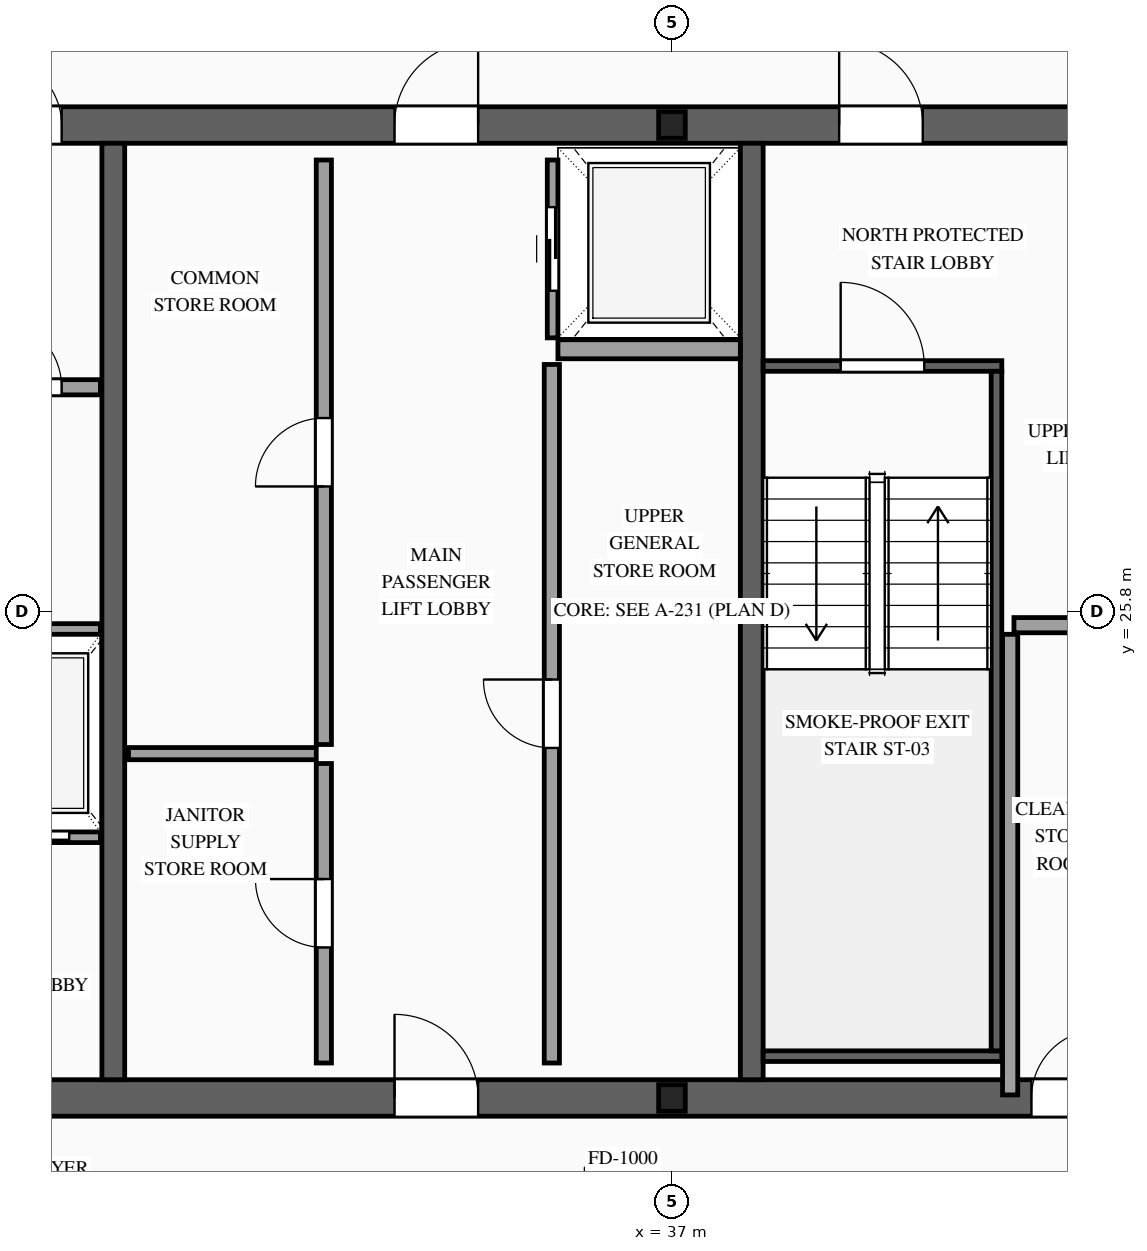
"""IFC4 building model, lengths in metres.
Left out: names, types, materials, properties, quantities, classifications, styles, units other than length and angle.
Written with IfcOpenShell. Run it as: python <this file> out.ifc"""

import sys

from ifc_helpers import new_model, si_unit, direction, frame, frame_2d, origin, origin_2d, place, context, subcontext, project, spatial, rectangle, i_section, extrude, source, transform, mapped, element, fill, save


model = new_model("IFC4")
c1 = context("Model", 3, precision=1e-05, world=origin(), true_north=direction((0.0, 1.0)))
c2 = subcontext(c1, "Body", "Model", "MODEL_VIEW")
j1 = project(units=[si_unit("LENGTHUNIT", "METRE"), si_unit("PLANEANGLEUNIT", "RADIAN")], contexts=[c1])
p1 = place(None, origin())
s1 = spatial("IfcSite", under=j1, at=p1, CompositionType="ELEMENT")
p2 = place(p1, origin())
s2 = spatial("IfcBuilding", under=s1, at=p2, CompositionType="ELEMENT")
p3 = place(p2, frame((0.0, 0.0, 285.6)))
s3 = spatial("IfcBuildingStorey", under=s2, at=p3, CompositionType="ELEMENT", Elevation=285.6)
p4 = place(p3, frame((23.56, 19.4, 0.0), z_axis=(0.0, 0.0, 1.0), x_axis=(1.0, 0.0, 0.0)))
e1 = element("IfcWall", 1, at=p4, inside=s3, PredefinedType="SHEAR", context=c2, shape_type="SweptSolid", body=[
    extrude(rectangle(XDim=26.88, YDim=0.48, at=frame_2d((13.44, 0.0))), origin(), (0.0, 0.0, 1.0), 3.5),
])
p5 = place(p4, frame((1.89, 0.0, 0.0)))
e2 = element("IfcOpeningElement", 2, at=p5, cuts=e1, PredefinedType="OPENING", context=c2, shape_type="SweptSolid", body=[
    extrude(rectangle(XDim=1.1, YDim=2.2, at=frame_2d((0.55, 1.1))), frame((0.0, 0.255, 0.0), z_axis=(0.0, -1.0, 0.0), x_axis=(1.0, 0.0, 0.0)), (0.0, 0.0, 1.0), 0.51),
])
p6 = place(p4, frame((9.79, 0.0, 0.0)))
e3 = element("IfcOpeningElement", 3, at=p6, cuts=e1, PredefinedType="OPENING", context=c2, shape_type="SweptSolid", body=[
    extrude(rectangle(XDim=1.1, YDim=2.2, at=frame_2d((0.55, 1.1))), frame((0.0, 0.255, 0.0), z_axis=(0.0, -1.0, 0.0), x_axis=(1.0, 0.0, 0.0)), (0.0, 0.0, 1.0), 0.51),
])
p7 = place(p4, frame((22.99, 0.0, 0.0)))
e4 = element("IfcOpeningElement", 4, at=p7, cuts=e1, PredefinedType="OPENING", context=c2, shape_type="SweptSolid", body=[
    extrude(rectangle(XDim=1.1, YDim=2.2, at=frame_2d((0.55, 1.1))), frame((0.0, 0.255, 0.0), z_axis=(0.0, -1.0, 0.0), x_axis=(1.0, 0.0, 0.0)), (0.0, 0.0, 1.0), 0.51),
])
p8 = place(p4, frame((19.61, 0.0, 0.0)))
e5 = element("IfcOpeningElement", 5, at=p8, cuts=e1, PredefinedType="OPENING", context=c2, shape_type="SweptSolid", body=[
    extrude(rectangle(XDim=0.9, YDim=2.15, at=frame_2d((0.45, 1.075))), frame((0.0, 0.255, 0.0), z_axis=(0.0, -1.0, 0.0), x_axis=(1.0, 0.0, 0.0)), (0.0, 0.0, 1.0), 0.51),
])
p9 = place(p4, frame((18.17, 0.0, 0.0)))
e6 = element("IfcOpeningElement", 6, at=p9, cuts=e1, PredefinedType="OPENING", context=c2, shape_type="SweptSolid", body=[
    extrude(rectangle(XDim=0.9, YDim=2.15, at=frame_2d((0.45, 1.075))), frame((0.0, 0.255, 0.0), z_axis=(0.0, -1.0, 0.0), x_axis=(1.0, 0.0, 0.0)), (0.0, 0.0, 1.0), 0.51),
])
p10 = place(p3, frame((23.56, 32.2, 0.0), z_axis=(0.0, 0.0, 1.0), x_axis=(1.0, 0.0, 0.0)))
e7 = element("IfcWall", 7, at=p10, inside=s3, PredefinedType="SHEAR", context=c2, shape_type="SweptSolid", body=[
    extrude(rectangle(XDim=26.88, YDim=0.48, at=frame_2d((13.44, 0.0))), origin(), (0.0, 0.0, 1.0), 3.5),
])
p11 = place(p10, frame((4.51, 0.0, 0.0)))
e8 = element("IfcOpeningElement", 8, at=p11, cuts=e7, PredefinedType="OPENING", context=c2, shape_type="SweptSolid", body=[
    extrude(rectangle(XDim=0.9, YDim=2.15, at=frame_2d((0.45, 1.075))), frame((0.0, 0.255, 0.0), z_axis=(0.0, -1.0, 0.0), x_axis=(1.0, 0.0, 0.0)), (0.0, 0.0, 1.0), 0.51),
])
p12 = place(p10, frame((9.79, 0.0, 0.0)))
e9 = element("IfcOpeningElement", 9, at=p12, cuts=e7, PredefinedType="OPENING", context=c2, shape_type="SweptSolid", body=[
    extrude(rectangle(XDim=1.1, YDim=2.2, at=frame_2d((0.55, 1.1))), frame((0.0, 0.255, 0.0), z_axis=(0.0, -1.0, 0.0), x_axis=(1.0, 0.0, 0.0)), (0.0, 0.0, 1.0), 0.51),
])
p13 = place(p10, frame((15.64, 0.0, 0.0)))
e10 = element("IfcOpeningElement", 10, at=p13, cuts=e7, PredefinedType="OPENING", context=c2, shape_type="SweptSolid", body=[
    extrude(rectangle(XDim=1.1, YDim=2.2, at=frame_2d((0.55, 1.1))), frame((0.0, 0.255, 0.0), z_axis=(0.0, -1.0, 0.0), x_axis=(1.0, 0.0, 0.0)), (0.0, 0.0, 1.0), 0.51),
])
p14 = place(p10, frame((18.74, 0.0, 0.0)))
e11 = element("IfcOpeningElement", 11, at=p14, cuts=e7, PredefinedType="OPENING", context=c2, shape_type="SweptSolid", body=[
    extrude(rectangle(XDim=1.1, YDim=2.2, at=frame_2d((0.55, 1.1))), frame((0.0, 0.255, 0.0), z_axis=(0.0, -1.0, 0.0), x_axis=(1.0, 0.0, 0.0)), (0.0, 0.0, 1.0), 0.51),
])
m1 = source(origin(), c2, "Body", "SweptSolid", [
    extrude(rectangle(XDim=12.32, YDim=0.3, at=frame_2d((6.16, 0.0))), origin(), (0.0, 0.0, 1.0), 3.5),
])
for number, where, z_axis, x_axis in (
    (12, (29.65, 19.64, 0.0), (0.0, 0.0, 1.0), (0.0, 1.0, 0.0)),
    (13, (38.05, 19.64, 0.0), (0.0, 0.0, 1.0), (0.0, 1.0, 0.0)),
):
    element("IfcWall", number, at=place(p3, frame(where, z_axis=z_axis, x_axis=x_axis)), inside=s3, PredefinedType="SOLIDWALL", context=c2, shape_type="MappedRepresentation", body=[
        mapped(m1, transform((0.0, 0.0, 0.0), scale=1.0)),
    ])
m2 = source(origin(), c2, "Body", "SweptSolid", [
    extrude(i_section(OverallWidth=0.35, OverallDepth=0.35, WebThickness=0.012, FlangeThickness=0.019, at=origin_2d()), origin(), (0.0, 0.0, 1.0), 3.5),
])
for number, where, z_axis, x_axis in (
    (14, (37.0, 19.4, 0.0), (0.0, 0.0, 1.0), (1.0, 0.0, 0.0)),
    (15, (37.0, 32.2, 0.0), (0.0, 0.0, 1.0), (1.0, 0.0, 0.0)),
):
    element("IfcColumn", number, at=place(p3, frame(where, z_axis=z_axis, x_axis=x_axis)), inside=s3, PredefinedType="COLUMN", context=c2, shape_type="MappedRepresentation", body=[
        mapped(m2, transform((0.0, 0.0, 0.0), scale=1.0)),
    ])
p15 = place(p3, frame((27.56, 22.83, 0.0), z_axis=(0.0, 0.0, 1.0), x_axis=(1.0, 0.0, 0.0)))
e16 = element("IfcWall", 16, at=p15, inside=s3, PredefinedType="SOLIDWALL", context=c2, shape_type="SweptSolid", body=[
    extrude(rectangle(XDim=1.92, YDim=0.14, at=frame_2d((0.96, 0.0))), origin(), (0.0, 0.0, 1.0), 3.28),
])
p16 = place(p15, frame((0.41, 0.0, 0.0)))
e17 = element("IfcOpeningElement", 17, at=p16, cuts=e16, PredefinedType="OPENING", context=c2, shape_type="SweptSolid", body=[
    extrude(rectangle(XDim=1.1, YDim=2.2, at=frame_2d((0.55, 1.1))), frame((0.0, 0.085, 0.0), z_axis=(0.0, -1.0, 0.0), x_axis=(1.0, 0.0, 0.0)), (0.0, 0.0, 1.0), 0.17),
])
m3 = source(origin(), c2, "Body", "SweptSolid", [
    extrude(rectangle(XDim=1.92, YDim=0.14, at=frame_2d((0.96, 0.0))), origin(), (0.0, 0.0, 1.0), 3.28),
])
p17 = place(p3, frame((27.56, 25.57, 0.0), z_axis=(0.0, 0.0, 1.0), x_axis=(1.0, 0.0, 0.0)))
e18 = element("IfcWall", 18, at=p17, inside=s3, PredefinedType="SOLIDWALL", context=c2, shape_type="MappedRepresentation", body=[
    mapped(m3, transform((0.0, 0.0, 0.0), scale=1.0)),
])
p18 = place(p3, frame((35.43, 29.4, 0.0), z_axis=(0.0, 0.0, 1.0), x_axis=(0.0, 1.0, 0.0)))
e19 = element("IfcWall", 19, at=p18, inside=s3, PredefinedType="SOLIDWALL", context=c2, shape_type="SweptSolid", body=[
    extrude(rectangle(XDim=2.34, YDim=0.14, at=frame_2d((1.17, 0.0))), origin(), (0.0, 0.0, 1.0), 3.28),
])
p19 = place(p18, frame((0.62, 0.0, 0.0)))
e20 = element("IfcOpeningElement", 20, at=p19, cuts=e19, PredefinedType="OPENING", context=c2, shape_type="SweptSolid", body=[
    extrude(rectangle(XDim=1.1, YDim=2.2, at=frame_2d((0.55, 1.1))), frame((0.0, 0.085, 0.0), z_axis=(0.0, -1.0, 0.0), x_axis=(1.0, 0.0, 0.0)), (0.0, 0.0, 1.0), 0.17),
])
m4 = source(origin(), c2, "Body", "SweptSolid", [
    extrude(rectangle(XDim=2.4, YDim=0.25, at=frame_2d((1.2, 0.0))), origin(), (0.0, 0.0, 1.0), 3.28),
])
p20 = place(p3, frame((35.5, 29.25, 0.0), z_axis=(0.0, 0.0, 1.0), x_axis=(1.0, 0.0, 0.0)))
e21 = element("IfcWall", 21, at=p20, inside=s3, PredefinedType="SOLIDWALL", context=c2, shape_type="MappedRepresentation", body=[
    mapped(m4, transform((0.0, 0.0, 0.0), scale=1.0)),
])
p21 = place(p3, frame((38.2, 29.03, 0.0), z_axis=(0.0, 0.0, 1.0), x_axis=(1.0, 0.0, 0.0)))
e22 = element("IfcWall", 22, at=p21, inside=s3, PredefinedType="SOLIDWALL", context=c2, shape_type="SweptSolid", body=[
    extrude(rectangle(XDim=3.14, YDim=0.14, at=frame_2d((1.57, 0.0))), origin(), (0.0, 0.0, 1.0), 3.28),
])
p22 = place(p21, frame((1.02, 0.0, 0.0)))
e23 = element("IfcOpeningElement", 23, at=p22, cuts=e22, PredefinedType="OPENING", context=c2, shape_type="SweptSolid", body=[
    extrude(rectangle(XDim=1.1, YDim=2.2, at=frame_2d((0.55, 1.1))), frame((0.0, 0.085, 0.0), z_axis=(0.0, -1.0, 0.0), x_axis=(1.0, 0.0, 0.0)), (0.0, 0.0, 1.0), 0.17),
])
m5 = source(origin(), c2, "Body", "SweptSolid", [
    extrude(rectangle(XDim=3.14, YDim=0.14, at=frame_2d((1.57, 0.0))), origin(), (0.0, 0.0, 1.0), 3.28),
])
p23 = place(p3, frame((38.2, 19.95, 0.0), z_axis=(0.0, 0.0, 1.0), x_axis=(1.0, 0.0, 0.0)))
e24 = element("IfcWall", 24, at=p23, inside=s3, PredefinedType="SOLIDWALL", context=c2, shape_type="MappedRepresentation", body=[
    mapped(m5, transform((0.0, 0.0, 0.0), scale=1.0)),
])
m6 = source(origin(), c2, "Body", "SweptSolid", [
    extrude(rectangle(XDim=8.94, YDim=0.14, at=frame_2d((4.47, 0.0))), origin(), (0.0, 0.0, 1.0), 3.28),
])
p24 = place(p3, frame((41.27, 20.02, 0.0), z_axis=(0.0, 0.0, 1.0), x_axis=(0.0, 1.0, 0.0)))
e25 = element("IfcWall", 25, at=p24, inside=s3, PredefinedType="SOLIDWALL", context=c2, shape_type="MappedRepresentation", body=[
    mapped(m6, transform((0.0, 0.0, 0.0), scale=1.0)),
])
p25 = place(p3, frame((27.56, 28.75, 0.0), z_axis=(0.0, 0.0, 1.0), x_axis=(1.0, 0.0, 0.0)))
e26 = element("IfcWall", 26, at=p25, inside=s3, PredefinedType="PARTITIONING", context=c2, shape_type="SweptSolid", body=[
    extrude(rectangle(XDim=1.92, YDim=0.2, at=frame_2d((0.96, 0.0))), origin(), (0.0, 0.0, 1.0), 3.28),
])
p26 = place(p25, frame((0.51, 0.0, 0.0)))
e27 = element("IfcOpeningElement", 27, at=p26, cuts=e26, PredefinedType="OPENING", context=c2, shape_type="SweptSolid", body=[
    extrude(rectangle(XDim=0.9, YDim=2.15, at=frame_2d((0.45, 1.075))), frame((0.0, 0.115, 0.0), z_axis=(0.0, -1.0, 0.0), x_axis=(1.0, 0.0, 0.0)), (0.0, 0.0, 1.0), 0.23),
])
p27 = place(p3, frame((32.42, 19.86, 0.0), z_axis=(0.0, 0.0, 1.0), x_axis=(0.0, 1.0, 0.0)))
e28 = element("IfcWall", 28, at=p27, inside=s3, PredefinedType="PARTITIONING", context=c2, shape_type="SweptSolid", body=[
    extrude(rectangle(XDim=3.94, YDim=0.2, at=frame_2d((1.97, 0.0))), origin(), (0.0, 0.0, 1.0), 3.28),
])
p28 = place(p27, frame((1.52, 0.0, 0.0)))
e29 = element("IfcOpeningElement", 29, at=p28, cuts=e28, PredefinedType="OPENING", context=c2, shape_type="SweptSolid", body=[
    extrude(rectangle(XDim=0.9, YDim=2.15, at=frame_2d((0.45, 1.075))), frame((0.0, 0.115, 0.0), z_axis=(0.0, -1.0, 0.0), x_axis=(1.0, 0.0, 0.0)), (0.0, 0.0, 1.0), 0.23),
])
p29 = place(p3, frame((32.42, 24.05, 0.0), z_axis=(0.0, 0.0, 1.0), x_axis=(0.0, 1.0, 0.0)))
e30 = element("IfcWall", 30, at=p29, inside=s3, PredefinedType="PARTITIONING", context=c2, shape_type="SweptSolid", body=[
    extrude(rectangle(XDim=7.69, YDim=0.2, at=frame_2d((3.845, 0.0))), origin(), (0.0, 0.0, 1.0), 3.28),
])
p30 = place(p29, frame((3.395, 0.0, 0.0)))
e31 = element("IfcOpeningElement", 31, at=p30, cuts=e30, PredefinedType="OPENING", context=c2, shape_type="SweptSolid", body=[
    extrude(rectangle(XDim=0.9, YDim=2.15, at=frame_2d((0.45, 1.075))), frame((0.0, 0.115, 0.0), z_axis=(0.0, -1.0, 0.0), x_axis=(1.0, 0.0, 0.0)), (0.0, 0.0, 1.0), 0.23),
])
m7 = source(origin(), c2, "Body", "SweptSolid", [
    extrude(rectangle(XDim=2.47, YDim=0.16, at=frame_2d((1.235, 0.0))), origin(), (0.0, 0.0, 1.0), 3.28),
])
p31 = place(p3, frame((29.85, 23.93, 0.0), z_axis=(0.0, 0.0, 1.0), x_axis=(1.0, 0.0, 0.0)))
e32 = element("IfcWall", 32, at=p31, inside=s3, PredefinedType="PARTITIONING", context=c2, shape_type="MappedRepresentation", body=[
    mapped(m7, transform((0.0, 0.0, 0.0), scale=1.0)),
])
p32 = place(p3, frame((35.42, 19.86, 0.0), z_axis=(0.0, 0.0, 1.0), x_axis=(0.0, 1.0, 0.0)))
e33 = element("IfcWall", 33, at=p32, inside=s3, PredefinedType="PARTITIONING", context=c2, shape_type="SweptSolid", body=[
    extrude(rectangle(XDim=9.19, YDim=0.2, at=frame_2d((4.595, 0.0))), origin(), (0.0, 0.0, 1.0), 3.28),
])
p33 = place(p32, frame((4.145, 0.0, 0.0)))
e34 = element("IfcOpeningElement", 34, at=p33, cuts=e33, PredefinedType="OPENING", context=c2, shape_type="SweptSolid", body=[
    extrude(rectangle(XDim=0.9, YDim=2.15, at=frame_2d((0.45, 1.075))), frame((0.0, 0.115, 0.0), z_axis=(0.0, -1.0, 0.0), x_axis=(1.0, 0.0, 0.0)), (0.0, 0.0, 1.0), 0.23),
])
m8 = source(origin(), c2, "Body", "SweptSolid", [
    extrude(rectangle(XDim=6.06, YDim=0.2, at=frame_2d((3.03, 0.0))), origin(), (0.0, 0.0, 1.0), 3.28),
])
p34 = place(p3, frame((41.45, 19.44, 0.0), z_axis=(0.0, 0.0, 1.0), x_axis=(0.0, 1.0, 0.0)))
e35 = element("IfcWall", 35, at=p34, inside=s3, PredefinedType="PARTITIONING", context=c2, shape_type="MappedRepresentation", body=[
    mapped(m8, transform((0.0, 0.0, 0.0), scale=1.0)),
])
m9 = source(origin(), c2, "Body", "SweptSolid", [
    extrude(rectangle(XDim=1.35, YDim=0.2, at=frame_2d((0.675, 0.0))), origin(), (0.0, 0.0, 1.0), 3.28),
])
p35 = place(p3, frame((41.5, 25.62, 0.0), z_axis=(0.0, 0.0, 1.0), x_axis=(1.0, 0.0, 0.0)))
e36 = element("IfcWall", 36, at=p35, inside=s3, PredefinedType="PARTITIONING", context=c2, shape_type="MappedRepresentation", body=[
    mapped(m9, transform((0.0, 0.0, 0.0), scale=1.0)),
])
m10 = source(origin(), c2, "Body", "SweptSolid", [
    extrude(rectangle(XDim=1.1, YDim=2.2, at=frame_2d((0.55, 1.1))), frame((0.0, 0.025, 0.0), z_axis=(0.0, -1.0, 0.0), x_axis=(1.0, 0.0, 0.0)), (0.0, 0.0, 1.0), 0.05),
])
p36 = place(p16, origin())
e37 = element("IfcDoor", 37, at=p36, inside=s3, OperationType="SLIDING_TO_LEFT", PredefinedType="DOOR", context=c2, shape_type="MappedRepresentation", body=[
    mapped(m10, transform((0.0, 0.0, 0.0), scale=1.0)),
])
fill(e17, e37)
p37 = place(p19, origin())
e38 = element("IfcDoor", 38, at=p37, inside=s3, OperationType="SLIDING_TO_RIGHT", PredefinedType="DOOR", context=c2, shape_type="MappedRepresentation", body=[
    mapped(m10, transform((0.0, 0.0, 0.0), scale=1.0)),
])
fill(e20, e38)
m11 = source(origin(), c2, "Body", "SweptSolid", [
    extrude(rectangle(XDim=1.1, YDim=2.2, at=frame_2d((0.55, 1.1))), frame((0.0, 0.025, 0.0), z_axis=(0.0, -1.0, 0.0), x_axis=(1.0, 0.0, 0.0)), (0.0, 0.0, 1.0), 0.05),
])
p38 = place(p22, origin())
e39 = element("IfcDoor", 39, at=p38, inside=s3, OperationType="SINGLE_SWING_LEFT", PredefinedType="DOOR", context=c2, shape_type="MappedRepresentation", body=[
    mapped(m11, transform((0.0, 0.0, 0.0), scale=1.0)),
])
fill(e23, e39)
p39 = place(p6, origin())
e40 = element("IfcDoor", 40, at=p39, inside=s3, OperationType="SINGLE_SWING_LEFT", PredefinedType="DOOR", context=c2, shape_type="MappedRepresentation", body=[
    mapped(m11, transform((0.0, 0.0, 0.0), scale=1.0)),
])
fill(e3, e40)
m12 = source(origin(), c2, "Body", "SweptSolid", [
    extrude(rectangle(XDim=0.9, YDim=2.15, at=frame_2d((0.45, 1.075))), frame((0.0, 0.025, 0.0), z_axis=(0.0, -1.0, 0.0), x_axis=(1.0, 0.0, 0.0)), (0.0, 0.0, 1.0), 0.05),
])
p40 = place(p11, origin())
e41 = element("IfcDoor", 41, at=p40, inside=s3, OperationType="SINGLE_SWING_LEFT", PredefinedType="DOOR", context=c2, shape_type="MappedRepresentation", body=[
    mapped(m12, transform((0.0, 0.0, 0.0), scale=1.0)),
])
fill(e8, e41)
p41 = place(p12, origin())
e42 = element("IfcDoor", 42, at=p41, inside=s3, OperationType="SINGLE_SWING_RIGHT", PredefinedType="DOOR", context=c2, shape_type="MappedRepresentation", body=[
    mapped(m11, transform((0.0, 0.0, 0.0), scale=1.0)),
])
fill(e9, e42)
p42 = place(p13, origin())
e43 = element("IfcDoor", 43, at=p42, inside=s3, OperationType="SINGLE_SWING_LEFT", PredefinedType="DOOR", context=c2, shape_type="MappedRepresentation", body=[
    mapped(m11, transform((0.0, 0.0, 0.0), scale=1.0)),
])
fill(e10, e43)
p43 = place(p26, origin())
e44 = element("IfcDoor", 44, at=p43, inside=s3, OperationType="SINGLE_SWING_LEFT", PredefinedType="DOOR", context=c2, shape_type="MappedRepresentation", body=[
    mapped(m12, transform((0.0, 0.0, 0.0), scale=1.0)),
])
fill(e27, e44)
p44 = place(p28, origin())
e45 = element("IfcDoor", 45, at=p44, inside=s3, OperationType="SINGLE_SWING_RIGHT", PredefinedType="DOOR", context=c2, shape_type="MappedRepresentation", body=[
    mapped(m12, transform((0.0, 0.0, 0.0), scale=1.0)),
])
fill(e29, e45)
p45 = place(p30, origin())
e46 = element("IfcDoor", 46, at=p45, inside=s3, OperationType="SINGLE_SWING_LEFT", PredefinedType="DOOR", context=c2, shape_type="MappedRepresentation", body=[
    mapped(m12, transform((0.0, 0.0, 0.0), scale=1.0)),
])
fill(e31, e46)
p46 = place(p33, origin())
e47 = element("IfcDoor", 47, at=p46, inside=s3, OperationType="SINGLE_SWING_RIGHT", PredefinedType="DOOR", context=c2, shape_type="MappedRepresentation", body=[
    mapped(m12, transform((0.0, 0.0, 0.0), scale=1.0)),
])
fill(e34, e47)
p47 = place(p9, origin())
e48 = element("IfcDoor", 48, at=p47, inside=s3, OperationType="SINGLE_SWING_RIGHT", PredefinedType="DOOR", context=c2, shape_type="MappedRepresentation", body=[
    mapped(m12, transform((0.0, 0.0, 0.0), scale=1.0)),
])
fill(e6, e48)
save(model, sys.argv[1])
